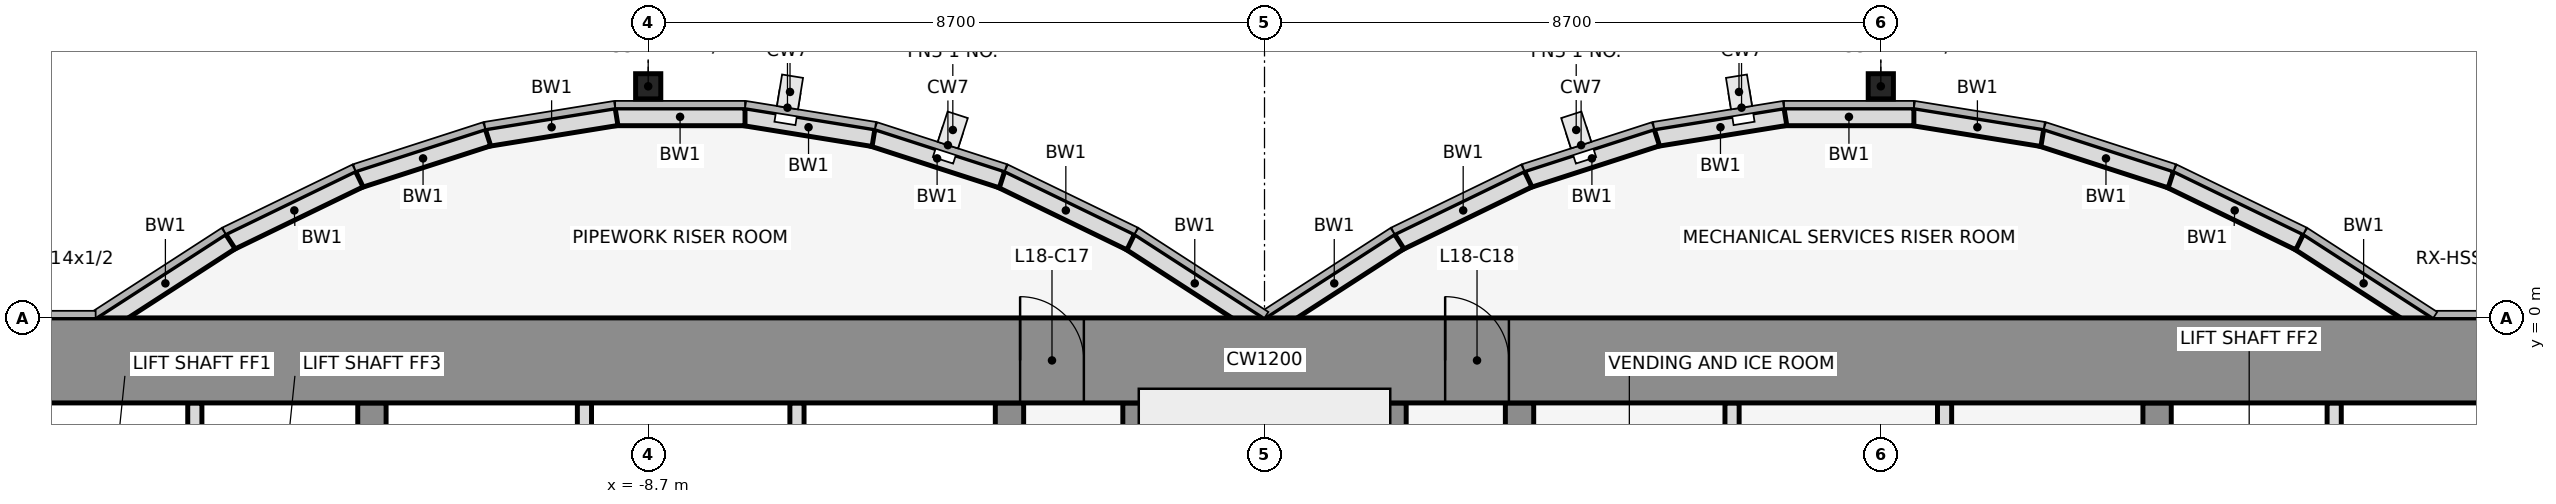
"""IFC4 building model, lengths in metres.
Left out: names, types, materials, properties, quantities, classifications, styles, units other than length and angle.
Written with IfcOpenShell. Run it as: python <this file> out.ifc"""

import sys

from ifc_helpers import new_model, si_unit, direction, frame, frame_2d, origin, origin_2d, place, context, subcontext, project, spatial, rectangle, hollow_rectangle, extrude, element, fill, save


model = new_model("IFC4")
c1 = context("Model", 3, precision=1e-05, world=origin(), true_north=direction((0.0, 1.0)))
c2 = subcontext(c1, "Body", "Model", "MODEL_VIEW")
j1 = project(units=[si_unit("LENGTHUNIT", "METRE"), si_unit("PLANEANGLEUNIT", "RADIAN")], contexts=[c1])
p1 = place(None, origin())
s1 = spatial("IfcSite", under=j1, at=p1, CompositionType="ELEMENT")
p2 = place(p1, origin())
s2 = spatial("IfcBuilding", under=s1, at=p2, CompositionType="ELEMENT")
p3 = place(p2, frame((0.0, 0.0, 89.9)))
s3 = spatial("IfcBuildingStorey", under=s2, at=p3, CompositionType="ELEMENT", Elevation=89.9)
for number, where, z_axis, x_axis in (
    (1, (-8.7, 3.269, 0.0), (0.0, 0.0, 1.0), (1.0, 0.0, 0.0)),
    (2, (8.7, 3.269, 0.0), (0.0, 0.0, 1.0), (1.0, 0.0, 0.0)),
):
    element("IfcColumn", number, at=place(p3, frame(where, z_axis=z_axis, x_axis=x_axis)), inside=s3, PredefinedType="COLUMN", context=c2, shape_type="SweptSolid", body=[
        extrude(hollow_rectangle(XDim=0.356, YDim=0.356, WallThickness=0.012, at=origin_2d()), origin(), (0.0, 0.0, 1.0), 4.1),
    ])
p4 = place(p3, frame((16.432, -0.105, 0.0), z_axis=(0.0, 0.0, 1.0), x_axis=(-0.83981312244, 0.542875602121, 0.0)))
e3 = element("IfcWall", 3, at=p4, inside=s3, PredefinedType="STANDARD", context=c2, shape_type="SweptSolid", body=[
    extrude(rectangle(XDim=2.183, YDim=0.25, at=frame_2d((1.091, 0.0))), origin(), (0.0, 0.0, 1.0), 3.95),
])
p5 = place(p3, frame((14.612, 1.073, 0.0), z_axis=(0.0, 0.0, 1.0), x_axis=(-0.89982408427, 0.436252928206, 0.0)))
e4 = element("IfcWall", 4, at=p5, inside=s3, PredefinedType="STANDARD", context=c2, shape_type="SweptSolid", body=[
    extrude(rectangle(XDim=2.038, YDim=0.25, at=frame_2d((1.019, 0.0))), origin(), (0.0, 0.0, 1.0), 3.95),
])
p6 = place(p3, frame((12.795, 1.955, 0.0), z_axis=(0.0, 0.0, 1.0), x_axis=(-0.951495806175, 0.307661714928, 0.0)))
e5 = element("IfcWall", 5, at=p6, inside=s3, PredefinedType="STANDARD", context=c2, shape_type="SweptSolid", body=[
    extrude(rectangle(XDim=1.927, YDim=0.25, at=frame_2d((0.963, 0.0))), origin(), (0.0, 0.0, 1.0), 3.95),
])
p7 = place(p3, frame((10.98, 2.543, 0.0), z_axis=(0.0, 0.0, 1.0), x_axis=(-0.987181718931, 0.159600293885, 0.0)))
e6 = element("IfcWall", 6, at=p7, inside=s3, PredefinedType="STANDARD", context=c2, shape_type="SweptSolid", body=[
    extrude(rectangle(XDim=1.857, YDim=0.25, at=frame_2d((0.929, 0.0))), origin(), (0.0, 0.0, 1.0), 3.95),
])
p8 = place(p3, frame((9.167, 2.838, 0.0), z_axis=(0.0, 0.0, 1.0), x_axis=(-1.0, 0.0, 0.0)))
e7 = element("IfcWall", 7, at=p8, inside=s3, PredefinedType="STANDARD", context=c2, shape_type="SweptSolid", body=[
    extrude(rectangle(XDim=1.833, YDim=0.25, at=frame_2d((0.917, 0.0))), origin(), (0.0, 0.0, 1.0), 3.95),
])
p9 = place(p3, frame((7.353, 2.84, 0.0), z_axis=(0.0, 0.0, 1.0), x_axis=(-0.987181718931, -0.159600293885, 0.0)))
e8 = element("IfcWall", 8, at=p9, inside=s3, PredefinedType="STANDARD", context=c2, shape_type="SweptSolid", body=[
    extrude(rectangle(XDim=1.857, YDim=0.25, at=frame_2d((0.929, 0.0))), origin(), (0.0, 0.0, 1.0), 3.95),
])
p10 = place(p3, frame((5.538, 2.548, 0.0), z_axis=(0.0, 0.0, 1.0), x_axis=(-0.951495806175, -0.307661714928, 0.0)))
e9 = element("IfcWall", 9, at=p10, inside=s3, PredefinedType="STANDARD", context=c2, shape_type="SweptSolid", body=[
    extrude(rectangle(XDim=1.927, YDim=0.25, at=frame_2d((0.963, 0.0))), origin(), (0.0, 0.0, 1.0), 3.95),
])
p11 = place(p3, frame((3.721, 1.962, 0.0), z_axis=(0.0, 0.0, 1.0), x_axis=(-0.89982408427, -0.436252928206, 0.0)))
e10 = element("IfcWall", 10, at=p11, inside=s3, PredefinedType="STANDARD", context=c2, shape_type="SweptSolid", body=[
    extrude(rectangle(XDim=2.038, YDim=0.25, at=frame_2d((1.019, 0.0))), origin(), (0.0, 0.0, 1.0), 3.95),
])
for number, where, z_axis, x_axis in (
    (11, (1.901, 1.08, 0.0), (0.0, 0.0, 1.0), (-0.84, -0.543, 0.0)),
    (12, (-0.068, -0.105, 0.0), (0.0, 0.0, 1.0), (-0.84, 0.543, 0.0)),
):
    element("IfcWall", number, at=place(p3, frame(where, z_axis=z_axis, x_axis=x_axis)), inside=s3, PredefinedType="STANDARD", context=c2, shape_type="SweptSolid", body=[
        extrude(rectangle(XDim=2.183, YDim=0.25, at=frame_2d((1.091, 0.0))), origin(), (0.0, 0.0, 1.0), 3.95),
    ])
p12 = place(p3, frame((-1.888, 1.073, 0.0), z_axis=(0.0, 0.0, 1.0), x_axis=(-0.89982408427, 0.436252928206, 0.0)))
e13 = element("IfcWall", 13, at=p12, inside=s3, PredefinedType="STANDARD", context=c2, shape_type="SweptSolid", body=[
    extrude(rectangle(XDim=2.038, YDim=0.25, at=frame_2d((1.019, 0.0))), origin(), (0.0, 0.0, 1.0), 3.95),
])
p13 = place(p3, frame((-3.705, 1.955, 0.0), z_axis=(0.0, 0.0, 1.0), x_axis=(-0.951495806175, 0.307661714928, 0.0)))
e14 = element("IfcWall", 14, at=p13, inside=s3, PredefinedType="STANDARD", context=c2, shape_type="SweptSolid", body=[
    extrude(rectangle(XDim=1.927, YDim=0.25, at=frame_2d((0.963, 0.0))), origin(), (0.0, 0.0, 1.0), 3.95),
])
p14 = place(p3, frame((-5.52, 2.543, 0.0), z_axis=(0.0, 0.0, 1.0), x_axis=(-0.987181718931, 0.159600293885, 0.0)))
e15 = element("IfcWall", 15, at=p14, inside=s3, PredefinedType="STANDARD", context=c2, shape_type="SweptSolid", body=[
    extrude(rectangle(XDim=1.857, YDim=0.25, at=frame_2d((0.929, 0.0))), origin(), (0.0, 0.0, 1.0), 3.95),
])
p15 = place(p3, frame((-7.333, 2.838, 0.0), z_axis=(0.0, 0.0, 1.0), x_axis=(-1.0, 0.0, 0.0)))
e16 = element("IfcWall", 16, at=p15, inside=s3, PredefinedType="STANDARD", context=c2, shape_type="SweptSolid", body=[
    extrude(rectangle(XDim=1.833, YDim=0.25, at=frame_2d((0.917, 0.0))), origin(), (0.0, 0.0, 1.0), 3.95),
])
p16 = place(p3, frame((-9.147, 2.84, 0.0), z_axis=(0.0, 0.0, 1.0), x_axis=(-0.987181718931, -0.159600293885, 0.0)))
e17 = element("IfcWall", 17, at=p16, inside=s3, PredefinedType="STANDARD", context=c2, shape_type="SweptSolid", body=[
    extrude(rectangle(XDim=1.857, YDim=0.25, at=frame_2d((0.929, 0.0))), origin(), (0.0, 0.0, 1.0), 3.95),
])
p17 = place(p3, frame((-10.962, 2.548, 0.0), z_axis=(0.0, 0.0, 1.0), x_axis=(-0.951495806175, -0.307661714928, 0.0)))
e18 = element("IfcWall", 18, at=p17, inside=s3, PredefinedType="STANDARD", context=c2, shape_type="SweptSolid", body=[
    extrude(rectangle(XDim=1.927, YDim=0.25, at=frame_2d((0.963, 0.0))), origin(), (0.0, 0.0, 1.0), 3.95),
])
p18 = place(p3, frame((-12.779, 1.962, 0.0), z_axis=(0.0, 0.0, 1.0), x_axis=(-0.89982408427, -0.436252928206, 0.0)))
e19 = element("IfcWall", 19, at=p18, inside=s3, PredefinedType="STANDARD", context=c2, shape_type="SweptSolid", body=[
    extrude(rectangle(XDim=2.038, YDim=0.25, at=frame_2d((1.019, 0.0))), origin(), (0.0, 0.0, 1.0), 3.95),
])
p19 = place(p3, frame((-14.599, 1.08, 0.0), z_axis=(0.0, 0.0, 1.0), x_axis=(-0.83981312244, -0.542875602121, 0.0)))
e20 = element("IfcWall", 20, at=p19, inside=s3, PredefinedType="STANDARD", context=c2, shape_type="SweptSolid", body=[
    extrude(rectangle(XDim=2.183, YDim=0.25, at=frame_2d((1.091, 0.0))), origin(), (0.0, 0.0, 1.0), 3.95),
])
p20 = place(p3, frame((-15.1, -4.6, 0.0), z_axis=(0.0, 0.0, 1.0), x_axis=(0.0, 1.0, 0.0)))
e21 = element("IfcWall", 21, at=p20, inside=s3, PredefinedType="PARTITIONING", context=c2, shape_type="SweptSolid", body=[
    extrude(rectangle(XDim=3.4, YDim=0.2, at=frame_2d((1.7, 0.0))), origin(), (0.0, 0.0, 1.0), 3.018),
])
p21 = place(p3, frame((-12.6, -11.8, 0.0), z_axis=(0.0, 0.0, 1.0), x_axis=(0.0, 1.0, 0.0)))
e22 = element("IfcWall", 22, at=p21, inside=s3, PredefinedType="SHEAR", context=c2, shape_type="SweptSolid", body=[
    extrude(rectangle(XDim=10.6, YDim=0.4, at=frame_2d((5.3, 0.0))), origin(), (0.0, 0.0, 1.0), 4.1),
])
p22 = place(p21, frame((4.75, 0.0, 0.0)))
e23 = element("IfcOpeningElement", 23, at=p22, cuts=e22, PredefinedType="OPENING", context=c2, shape_type="SweptSolid", body=[
    extrude(rectangle(XDim=1.1, YDim=2.1, at=frame_2d((0.55, 1.05))), frame((0.0, 0.212, 0.0), z_axis=(0.0, -1.0, 0.0), x_axis=(1.0, 0.0, 0.0)), (0.0, 0.0, 1.0), 0.424),
])
for number, where, z_axis, x_axis in (
    (24, (-9.6, -4.6, 0.0), (0.0, 0.0, 1.0), (0.0, 1.0, 0.0)),
    (25, (-6.6, -4.6, 0.0), (0.0, 0.0, 1.0), (0.0, 1.0, 0.0)),
):
    element("IfcWall", number, at=place(p3, frame(where, z_axis=z_axis, x_axis=x_axis)), inside=s3, PredefinedType="PARTITIONING", context=c2, shape_type="SweptSolid", body=[
        extrude(rectangle(XDim=3.4, YDim=0.2, at=frame_2d((1.7, 0.0))), origin(), (0.0, 0.0, 1.0), 3.018),
    ])
p23 = place(p3, frame((-3.6, -11.8, 0.0), z_axis=(0.0, 0.0, 1.0), x_axis=(0.0, 1.0, 0.0)))
e26 = element("IfcWall", 26, at=p23, inside=s3, PredefinedType="SHEAR", context=c2, shape_type="SweptSolid", body=[
    extrude(rectangle(XDim=10.6, YDim=0.4, at=frame_2d((5.3, 0.0))), origin(), (0.0, 0.0, 1.0), 4.1),
])
p24 = place(p23, frame((4.85, 0.0, 0.0)))
e27 = element("IfcOpeningElement", 27, at=p24, cuts=e26, PredefinedType="OPENING", context=c2, shape_type="SweptSolid", body=[
    extrude(rectangle(XDim=0.9, YDim=2.1, at=frame_2d((0.45, 1.05))), frame((0.0, 0.212, 0.0), z_axis=(0.0, -1.0, 0.0), x_axis=(1.0, 0.0, 0.0)), (0.0, 0.0, 1.0), 0.424),
])
for number, where, z_axis, x_axis in (
    (28, (-1.8, -11.8, 0.0), (0.0, 0.0, 1.0), (0.0, 1.0, 0.0)),
    (29, (1.8, -11.8, 0.0), (0.0, 0.0, 1.0), (0.0, 1.0, 0.0)),
):
    element("IfcWall", number, at=place(p3, frame(where, z_axis=z_axis, x_axis=x_axis)), inside=s3, PredefinedType="SHEAR", context=c2, shape_type="SweptSolid", body=[
        extrude(rectangle(XDim=10.6, YDim=0.4, at=frame_2d((5.3, 0.0))), origin(), (0.0, 0.0, 1.0), 4.1),
    ])
p25 = place(p3, frame((3.6, -11.8, 0.0), z_axis=(0.0, 0.0, 1.0), x_axis=(0.0, 1.0, 0.0)))
e30 = element("IfcWall", 30, at=p25, inside=s3, PredefinedType="SHEAR", context=c2, shape_type="SweptSolid", body=[
    extrude(rectangle(XDim=10.6, YDim=0.4, at=frame_2d((5.3, 0.0))), origin(), (0.0, 0.0, 1.0), 4.1),
])
p26 = place(p25, frame((1.35, 0.0, 0.0)))
e31 = element("IfcOpeningElement", 31, at=p26, cuts=e30, PredefinedType="OPENING", context=c2, shape_type="SweptSolid", body=[
    extrude(rectangle(XDim=0.9, YDim=2.1, at=frame_2d((0.45, 1.05))), frame((0.0, 0.212, 0.0), z_axis=(0.0, -1.0, 0.0), x_axis=(1.0, 0.0, 0.0)), (0.0, 0.0, 1.0), 0.424),
])
for number, where, z_axis, x_axis in (
    (32, (6.6, -4.6, 0.0), (0.0, 0.0, 1.0), (0.0, 1.0, 0.0)),
    (33, (9.6, -4.6, 0.0), (0.0, 0.0, 1.0), (0.0, 1.0, 0.0)),
):
    element("IfcWall", number, at=place(p3, frame(where, z_axis=z_axis, x_axis=x_axis)), inside=s3, PredefinedType="PARTITIONING", context=c2, shape_type="SweptSolid", body=[
        extrude(rectangle(XDim=3.4, YDim=0.2, at=frame_2d((1.7, 0.0))), origin(), (0.0, 0.0, 1.0), 3.018),
    ])
p27 = place(p3, frame((12.6, -11.8, 0.0), z_axis=(0.0, 0.0, 1.0), x_axis=(0.0, 1.0, 0.0)))
e34 = element("IfcWall", 34, at=p27, inside=s3, PredefinedType="SHEAR", context=c2, shape_type="SweptSolid", body=[
    extrude(rectangle(XDim=10.6, YDim=0.4, at=frame_2d((5.3, 0.0))), origin(), (0.0, 0.0, 1.0), 4.1),
])
p28 = place(p27, frame((4.75, 0.0, 0.0)))
e35 = element("IfcOpeningElement", 35, at=p28, cuts=e34, PredefinedType="OPENING", context=c2, shape_type="SweptSolid", body=[
    extrude(rectangle(XDim=1.1, YDim=2.1, at=frame_2d((0.55, 1.05))), frame((0.0, 0.212, 0.0), z_axis=(0.0, -1.0, 0.0), x_axis=(1.0, 0.0, 0.0)), (0.0, 0.0, 1.0), 0.424),
])
p29 = place(p3, frame((15.1, -4.6, 0.0), z_axis=(0.0, 0.0, 1.0), x_axis=(0.0, 1.0, 0.0)))
e36 = element("IfcWall", 36, at=p29, inside=s3, PredefinedType="PARTITIONING", context=c2, shape_type="SweptSolid", body=[
    extrude(rectangle(XDim=3.4, YDim=0.2, at=frame_2d((1.7, 0.0))), origin(), (0.0, 0.0, 1.0), 3.018),
])
p30 = place(p3, frame((-22.0, -0.6, 0.0), z_axis=(0.0, 0.0, 1.0), x_axis=(1.0, 0.0, 0.0)))
e37 = element("IfcWall", 37, at=p30, inside=s3, PredefinedType="SHEAR", context=c2, shape_type="SweptSolid", body=[
    extrude(rectangle(XDim=44.0, YDim=1.2, at=frame_2d((22.0, 0.0))), origin(), (0.0, 0.0, 1.0), 4.1),
])
p31 = place(p30, frame((18.55, 0.0, 0.0)))
e38 = element("IfcOpeningElement", 38, at=p31, cuts=e37, PredefinedType="OPENING", context=c2, shape_type="SweptSolid", body=[
    extrude(rectangle(XDim=0.9, YDim=2.1, at=frame_2d((0.45, 1.05))), frame((0.0, 0.612, 0.0), z_axis=(0.0, -1.0, 0.0), x_axis=(1.0, 0.0, 0.0)), (0.0, 0.0, 1.0), 1.224),
])
p32 = place(p30, frame((24.55, 0.0, 0.0)))
e39 = element("IfcOpeningElement", 39, at=p32, cuts=e37, PredefinedType="OPENING", context=c2, shape_type="SweptSolid", body=[
    extrude(rectangle(XDim=0.9, YDim=2.1, at=frame_2d((0.45, 1.05))), frame((0.0, 0.612, 0.0), z_axis=(0.0, -1.0, 0.0), x_axis=(1.0, 0.0, 0.0)), (0.0, 0.0, 1.0), 1.224),
])
p33 = place(p31, origin())
e40 = element("IfcDoor", 40, at=p33, inside=s3, OperationType="SINGLE_SWING_LEFT", PredefinedType="DOOR", context=c2, shape_type="SweptSolid", body=[
    extrude(rectangle(XDim=0.9, YDim=2.1, at=frame_2d((0.45, 1.05))), frame((0.0, 0.025, 0.0), z_axis=(0.0, -1.0, 0.0), x_axis=(1.0, 0.0, 0.0)), (0.0, 0.0, 1.0), 0.05),
])
fill(e38, e40)
p34 = place(p32, origin())
e41 = element("IfcDoor", 41, at=p34, inside=s3, OperationType="SINGLE_SWING_LEFT", PredefinedType="DOOR", context=c2, shape_type="SweptSolid", body=[
    extrude(rectangle(XDim=0.9, YDim=2.1, at=frame_2d((0.45, 1.05))), frame((0.0, 0.025, 0.0), z_axis=(0.0, -1.0, 0.0), x_axis=(1.0, 0.0, 0.0)), (0.0, 0.0, 1.0), 0.05),
])
fill(e39, e41)
save(model, sys.argv[1])
